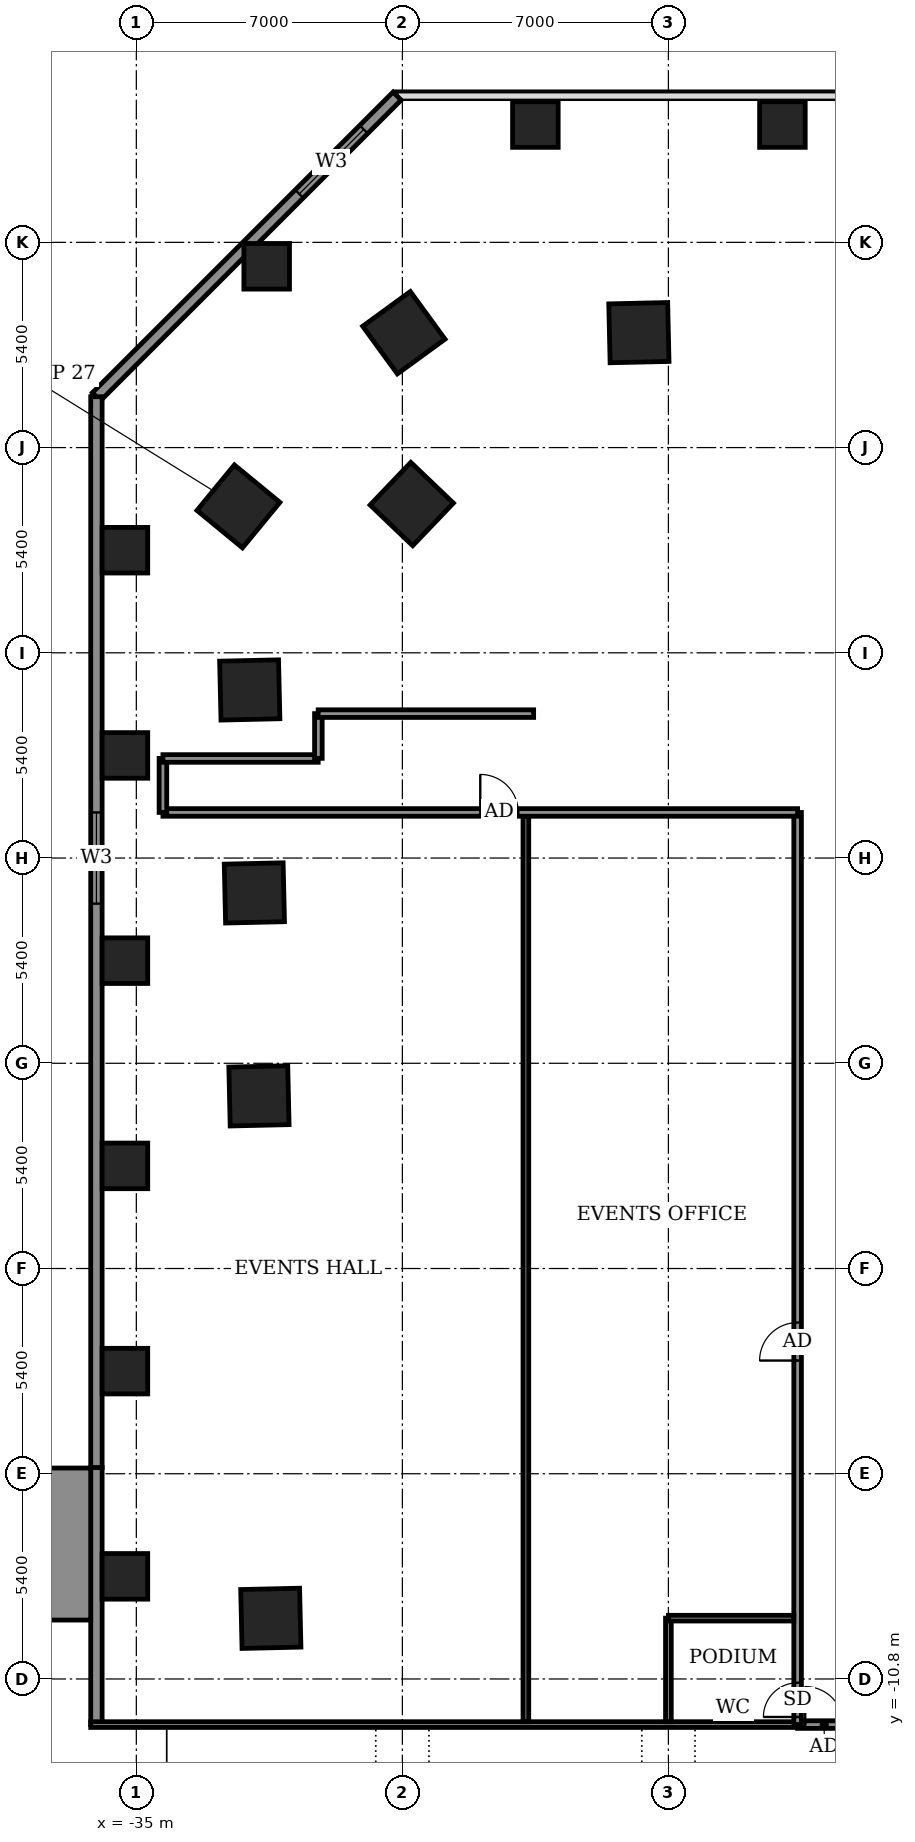
"""IFC4 building model, lengths in metres.
Left out: names, types, materials, properties, quantities, classifications, styles, units other than length and angle.
Written with IfcOpenShell. Run it as: python <this file> out.ifc"""

import sys

from ifc_helpers import new_model, si_unit, direction, frame, frame_2d, origin, origin_2d, place, context, subcontext, project, spatial, rectangle, extrude, element, fill, save


model = new_model("IFC4")
c1 = context("Model", 3, precision=1e-05, world=origin(), true_north=direction((0.0, 1.0)))
c2 = subcontext(c1, "Body", "Model", "MODEL_VIEW")
j1 = project(units=[si_unit("LENGTHUNIT", "METRE"), si_unit("PLANEANGLEUNIT", "RADIAN")], contexts=[c1])
p1 = place(None, origin())
s1 = spatial("IfcSite", under=j1, at=p1, CompositionType="ELEMENT")
p2 = place(p1, origin())
s2 = spatial("IfcBuilding", under=s1, at=p2, CompositionType="ELEMENT")
p3 = place(p2, frame((0.0, 0.0, 20.5)))
s3 = spatial("IfcBuildingStorey", under=s2, at=p3, CompositionType="ELEMENT", Elevation=20.5)
for number, where, z_axis, x_axis in (
    (1, (-31.461, -9.204, -0.55), (0.0, 0.0, 1.0), (0.023, -1.0, 0.0)),
    (2, (-21.776, 24.624, -0.55), (0.0, 0.0, 1.0), (-1.0, -0.023, 0.0)),
    (3, (-27.961, 24.623, -0.55), (0.0, 0.0, 1.0), (-0.808, -0.589, 0.0)),
    (4, (-27.753, 20.115, -0.55), (0.0, 0.0, 1.0), (-0.691, -0.723, 0.0)),
    (5, (-32.313, 20.053, -0.55), (0.0, 0.0, 1.0), (-0.635, -0.772, 0.0)),
    (6, (-32.015, 15.223, -0.55), (0.0, 0.0, 1.0), (0.023, -1.0, 0.0)),
    (7, (-31.894, 9.883, -0.55), (0.0, 0.0, 1.0), (0.023, -1.0, 0.0)),
    (8, (-31.773, 4.542, -0.55), (0.0, 0.0, 1.0), (0.023, -1.0, 0.0)),
):
    element("IfcColumn", number, at=place(p3, frame(where, z_axis=z_axis, x_axis=x_axis)), inside=s3, PredefinedType="COLUMN", context=c2, shape_type="SweptSolid", body=[
        extrude(rectangle(XDim=1.55, YDim=1.55, at=origin_2d()), origin(), (0.0, 0.0, 1.0), 4.5),
    ])
for number, where, z_axis, x_axis in (
    (9, (-24.5, 30.1, -0.55), (0.0, 0.0, 1.0), (1.0, 0.0, 0.0)),
    (10, (-18.0, 30.1, -0.55), (0.0, 0.0, 1.0), (1.0, 0.0, 0.0)),
    (11, (-35.3, -8.1, -0.55), (0.0, 0.0, 1.0), (1.0, 0.0, 0.0)),
    (12, (-35.3, -2.7, -0.55), (0.0, 0.0, 1.0), (1.0, 0.0, 0.0)),
    (13, (-35.3, 2.7, -0.55), (0.0, 0.0, 1.0), (1.0, 0.0, 0.0)),
    (14, (-35.3, 8.1, -0.55), (0.0, 0.0, 1.0), (1.0, 0.0, 0.0)),
    (15, (-35.3, 13.5, -0.55), (0.0, 0.0, 1.0), (1.0, 0.0, 0.0)),
    (16, (-35.3, 18.9, -0.55), (0.0, 0.0, 1.0), (1.0, 0.0, 0.0)),
    (17, (-31.57, 26.37, -0.55), (0.0, 0.0, 1.0), (1.0, 0.0, 0.0)),
):
    element("IfcColumn", number, at=place(p3, frame(where, z_axis=z_axis, x_axis=x_axis)), inside=s3, PredefinedType="COLUMN", context=c2, shape_type="SweptSolid", body=[
        extrude(rectangle(XDim=1.2, YDim=1.2, at=origin_2d()), origin(), (0.0, 0.0, 1.0), 4.5),
    ])
p4 = place(p3, frame((-28.138, 30.85, 0.0), z_axis=(0.0, 0.0, 1.0), x_axis=(-0.707106781187, -0.707106781187, 0.0)))
e18 = element("IfcWall", 18, at=p4, inside=s3, PredefinedType="SOLIDWALL", context=c2, shape_type="SweptSolid", body=[
    extrude(rectangle(XDim=11.189, YDim=0.3, at=frame_2d((5.595, 0.0))), origin(), (0.0, 0.0, 1.0), 3.95),
])
p5 = place(p4, frame((1.242, 0.0, 0.9)))
e19 = element("IfcOpeningElement", 19, at=p5, cuts=e18, PredefinedType="OPENING", context=c2, shape_type="SweptSolid", body=[
    extrude(rectangle(XDim=2.4, YDim=1.8, at=frame_2d((1.2, 0.9))), frame((0.0, 0.16, 0.0), z_axis=(0.0, -1.0, 0.0), x_axis=(1.0, 0.0, 0.0)), (0.0, 0.0, 1.0), 0.32),
])
p6 = place(p3, frame((-36.05, -5.236, 0.0), z_axis=(0.0, 0.0, 1.0), x_axis=(0.0, -1.0, 0.0)))
e20 = element("IfcWall", 20, at=p6, inside=s3, PredefinedType="SOLIDWALL", context=c2, shape_type="SweptSolid", body=[
    extrude(rectangle(XDim=6.764, YDim=0.3, at=frame_2d((3.382, 0.0))), origin(), (0.0, 0.0, 1.0), 3.95),
])
p7 = place(p3, frame((-36.05, 22.938, 0.0), z_axis=(0.0, 0.0, 1.0), x_axis=(0.0, -1.0, 0.0)))
e21 = element("IfcWall", 21, at=p7, inside=s3, PredefinedType="SOLIDWALL", context=c2, shape_type="SweptSolid", body=[
    extrude(rectangle(XDim=28.174, YDim=0.3, at=frame_2d((14.087, 0.0))), origin(), (0.0, 0.0, 1.0), 3.95),
])
p8 = place(p7, frame((10.938, 0.0, 0.9)))
e22 = element("IfcOpeningElement", 22, at=p8, cuts=e21, PredefinedType="OPENING", context=c2, shape_type="SweptSolid", body=[
    extrude(rectangle(XDim=2.4, YDim=1.8, at=frame_2d((1.2, 0.9))), frame((0.0, 0.16, 0.0), z_axis=(0.0, -1.0, 0.0), x_axis=(1.0, 0.0, 0.0)), (0.0, 0.0, 1.0), 0.32),
])
p9 = place(p3, frame((-37.45, -9.25, 0.0), z_axis=(0.0, 0.0, 1.0), x_axis=(0.0, 1.0, 0.0)))
e23 = element("IfcWall", 23, at=p9, inside=s3, PredefinedType="STANDARD", context=c2, shape_type="SweptSolid", body=[
    extrude(rectangle(XDim=4.0, YDim=2.5, at=frame_2d((2.0, 0.0))), origin(), (0.0, 0.0, 1.0), 4.5),
])
p10 = place(p3, frame((-36.2, -12.0, 0.0), z_axis=(0.0, 0.0, 1.0), x_axis=(1.0, 0.0, 0.0)))
e24 = element("IfcWall", 24, at=p10, inside=s3, PredefinedType="PARTITIONING", context=c2, shape_type="SweptSolid", body=[
    extrude(rectangle(XDim=18.604, YDim=0.15, at=frame_2d((9.302, 0.0))), origin(), (0.0, 0.0, 1.0), 3.95),
])
p11 = place(p3, frame((-24.75, -11.925, 0.0), z_axis=(0.0, 0.0, 1.0), x_axis=(0.0, 1.0, 0.0)))
e25 = element("IfcWall", 25, at=p11, inside=s3, PredefinedType="PARTITIONING", context=c2, shape_type="SweptSolid", body=[
    extrude(rectangle(XDim=23.825, YDim=0.15, at=frame_2d((11.913, 0.0))), origin(), (0.0, 0.0, 1.0), 3.95),
])
p12 = place(p3, frame((-21.0, -11.925, 0.0), z_axis=(0.0, 0.0, 1.0), x_axis=(0.0, 1.0, 0.0)))
e26 = element("IfcWall", 26, at=p12, inside=s3, PredefinedType="PARTITIONING", context=c2, shape_type="SweptSolid", body=[
    extrude(rectangle(XDim=2.725, YDim=0.15, at=frame_2d((1.363, 0.0))), origin(), (0.0, 0.0, 1.0), 3.95),
])
p13 = place(p3, frame((-17.6, -12.0, 0.0), z_axis=(0.0, 0.0, 1.0), x_axis=(1.0, 0.0, 0.0)))
e27 = element("IfcWall", 27, at=p13, inside=s3, PredefinedType="PARTITIONING", context=c2, shape_type="SweptSolid", body=[
    extrude(rectangle(XDim=2.8, YDim=0.2, at=frame_2d((1.4, 0.0))), origin(), (0.0, 0.0, 1.0), 3.95),
])
p14 = place(p13, frame((0.2, 0.0, 0.0)))
e28 = element("IfcOpeningElement", 28, at=p14, cuts=e27, PredefinedType="OPENING", context=c2, shape_type="SweptSolid", body=[
    extrude(rectangle(XDim=1.0, YDim=2.1, at=frame_2d((0.5, 1.05))), frame((0.0, 0.11, 0.0), z_axis=(0.0, -1.0, 0.0), x_axis=(1.0, 0.0, 0.0)), (0.0, 0.0, 1.0), 0.22),
])
p15 = place(p3, frame((-17.6, -12.0, 0.0), z_axis=(0.0, 0.0, 1.0), x_axis=(0.0, 1.0, 0.0)))
e29 = element("IfcWall", 29, at=p15, inside=s3, PredefinedType="PARTITIONING", context=c2, shape_type="SweptSolid", body=[
    extrude(rectangle(XDim=24.0, YDim=0.2, at=frame_2d((12.0, 0.0))), origin(), (0.0, 0.0, 1.0), 3.95),
])
p16 = place(p15, frame((9.578, 0.0, 0.0)))
e30 = element("IfcOpeningElement", 30, at=p16, cuts=e29, PredefinedType="OPENING", context=c2, shape_type="SweptSolid", body=[
    extrude(rectangle(XDim=1.0, YDim=2.1, at=frame_2d((0.5, 1.05))), frame((0.0, 0.11, 0.0), z_axis=(0.0, -1.0, 0.0), x_axis=(1.0, 0.0, 0.0)), (0.0, 0.0, 1.0), 0.22),
])
p17 = place(p15, frame((0.2, 0.0, 0.0)))
e31 = element("IfcOpeningElement", 31, at=p17, cuts=e29, PredefinedType="OPENING", context=c2, shape_type="SweptSolid", body=[
    extrude(rectangle(XDim=0.9, YDim=2.1, at=frame_2d((0.45, 1.05))), frame((0.0, 0.11, 0.0), z_axis=(0.0, -1.0, 0.0), x_axis=(1.0, 0.0, 0.0)), (0.0, 0.0, 1.0), 0.22),
])
p18 = place(p3, frame((-21.0, -9.2, 0.0), z_axis=(0.0, 0.0, 1.0), x_axis=(1.0, 0.0, 0.0)))
e32 = element("IfcWall", 32, at=p18, inside=s3, PredefinedType="PARTITIONING", context=c2, shape_type="SweptSolid", body=[
    extrude(rectangle(XDim=3.3, YDim=0.15, at=frame_2d((1.65, 0.0))), origin(), (0.0, 0.0, 1.0), 3.95),
])
p19 = place(p3, frame((-34.3, 12.0, 0.0), z_axis=(0.0, 0.0, 1.0), x_axis=(1.0, 0.0, 0.0)))
e33 = element("IfcWall", 33, at=p19, inside=s3, PredefinedType="PARTITIONING", context=c2, shape_type="SweptSolid", body=[
    extrude(rectangle(XDim=16.7, YDim=0.2, at=frame_2d((8.35, 0.0))), origin(), (0.0, 0.0, 1.0), 3.95),
])
p20 = place(p19, frame((8.35, 0.0, 0.0)))
e34 = element("IfcOpeningElement", 34, at=p20, cuts=e33, PredefinedType="OPENING", context=c2, shape_type="SweptSolid", body=[
    extrude(rectangle(XDim=1.0, YDim=2.1, at=frame_2d((0.5, 1.05))), frame((0.0, 0.11, 0.0), z_axis=(0.0, -1.0, 0.0), x_axis=(1.0, 0.0, 0.0)), (0.0, 0.0, 1.0), 0.22),
])
p21 = place(p3, frame((-34.3, 12.0, 0.0), z_axis=(0.0, 0.0, 1.0), x_axis=(0.0, 1.0, 0.0)))
e35 = element("IfcWall", 35, at=p21, inside=s3, PredefinedType="PARTITIONING", context=c2, shape_type="SweptSolid", body=[
    extrude(rectangle(XDim=1.423, YDim=0.2, at=frame_2d((0.711, 0.0))), origin(), (0.0, 0.0, 1.0), 3.95),
])
p22 = place(p3, frame((-34.3, 13.42, 0.0), z_axis=(0.0, 0.0, 1.0), x_axis=(1.0, 0.0, 0.0)))
e36 = element("IfcWall", 36, at=p22, inside=s3, PredefinedType="PARTITIONING", context=c2, shape_type="SweptSolid", body=[
    extrude(rectangle(XDim=4.085, YDim=0.2, at=frame_2d((2.042, 0.0))), origin(), (0.0, 0.0, 1.0), 3.95),
])
p23 = place(p3, frame((-30.21, 13.423, 0.0), z_axis=(0.0, 0.0, 1.0), x_axis=(0.0, 1.0, 0.0)))
e37 = element("IfcWall", 37, at=p23, inside=s3, PredefinedType="PARTITIONING", context=c2, shape_type="SweptSolid", body=[
    extrude(rectangle(XDim=1.177, YDim=0.2, at=frame_2d((0.588, 0.0))), origin(), (0.0, 0.0, 1.0), 3.95),
])
p24 = place(p3, frame((-30.215, 14.6, 0.0), z_axis=(0.0, 0.0, 1.0), x_axis=(1.0, 0.0, 0.0)))
e38 = element("IfcWall", 38, at=p24, inside=s3, PredefinedType="PARTITIONING", context=c2, shape_type="SweptSolid", body=[
    extrude(rectangle(XDim=5.669, YDim=0.2, at=frame_2d((2.834, 0.0))), origin(), (0.0, 0.0, 1.0), 3.95),
])
p25 = place(p5, origin())
e39 = element("IfcWindow", 39, at=p25, inside=s3, PartitioningType="DOUBLE_PANEL_VERTICAL", PredefinedType="WINDOW", context=c2, shape_type="SweptSolid", body=[
    extrude(rectangle(XDim=2.4, YDim=1.8, at=frame_2d((1.2, 0.9))), frame((0.0, 0.03, 0.0), z_axis=(0.0, -1.0, 0.0), x_axis=(1.0, 0.0, 0.0)), (0.0, 0.0, 1.0), 0.06),
])
fill(e19, e39)
p26 = place(p8, origin())
e40 = element("IfcWindow", 40, at=p26, inside=s3, PartitioningType="DOUBLE_PANEL_VERTICAL", PredefinedType="WINDOW", context=c2, shape_type="SweptSolid", body=[
    extrude(rectangle(XDim=2.4, YDim=1.8, at=frame_2d((1.2, 0.9))), frame((0.0, 0.03, 0.0), z_axis=(0.0, -1.0, 0.0), x_axis=(1.0, 0.0, 0.0)), (0.0, 0.0, 1.0), 0.06),
])
fill(e22, e40)
p27 = place(p16, origin())
e41 = element("IfcDoor", 41, at=p27, inside=s3, OperationType="SINGLE_SWING_LEFT", PredefinedType="DOOR", context=c2, shape_type="SweptSolid", body=[
    extrude(rectangle(XDim=1.0, YDim=2.1, at=frame_2d((0.5, 1.05))), frame((0.0, 0.025, 0.0), z_axis=(0.0, -1.0, 0.0), x_axis=(1.0, 0.0, 0.0)), (0.0, 0.0, 1.0), 0.05),
])
fill(e30, e41)
p28 = place(p17, origin())
e42 = element("IfcDoor", 42, at=p28, inside=s3, OperationType="SINGLE_SWING_LEFT", PredefinedType="DOOR", context=c2, shape_type="SweptSolid", body=[
    extrude(rectangle(XDim=0.9, YDim=2.1, at=frame_2d((0.45, 1.05))), frame((0.0, 0.025, 0.0), z_axis=(0.0, -1.0, 0.0), x_axis=(1.0, 0.0, 0.0)), (0.0, 0.0, 1.0), 0.05),
])
fill(e31, e42)
p29 = place(p20, origin())
e43 = element("IfcDoor", 43, at=p29, inside=s3, OperationType="SINGLE_SWING_RIGHT", PredefinedType="DOOR", context=c2, shape_type="SweptSolid", body=[
    extrude(rectangle(XDim=1.0, YDim=2.1, at=frame_2d((0.5, 1.05))), frame((0.0, 0.025, 0.0), z_axis=(0.0, -1.0, 0.0), x_axis=(1.0, 0.0, 0.0)), (0.0, 0.0, 1.0), 0.05),
])
fill(e34, e43)
p30 = place(p14, origin())
e44 = element("IfcDoor", 44, at=p30, inside=s3, OperationType="SINGLE_SWING_RIGHT", PredefinedType="DOOR", context=c2, shape_type="SweptSolid", body=[
    extrude(rectangle(XDim=1.0, YDim=2.1, at=frame_2d((0.5, 1.05))), frame((0.0, 0.025, 0.0), z_axis=(0.0, -1.0, 0.0), x_axis=(1.0, 0.0, 0.0)), (0.0, 0.0, 1.0), 0.05),
])
fill(e28, e44)
save(model, sys.argv[1])
